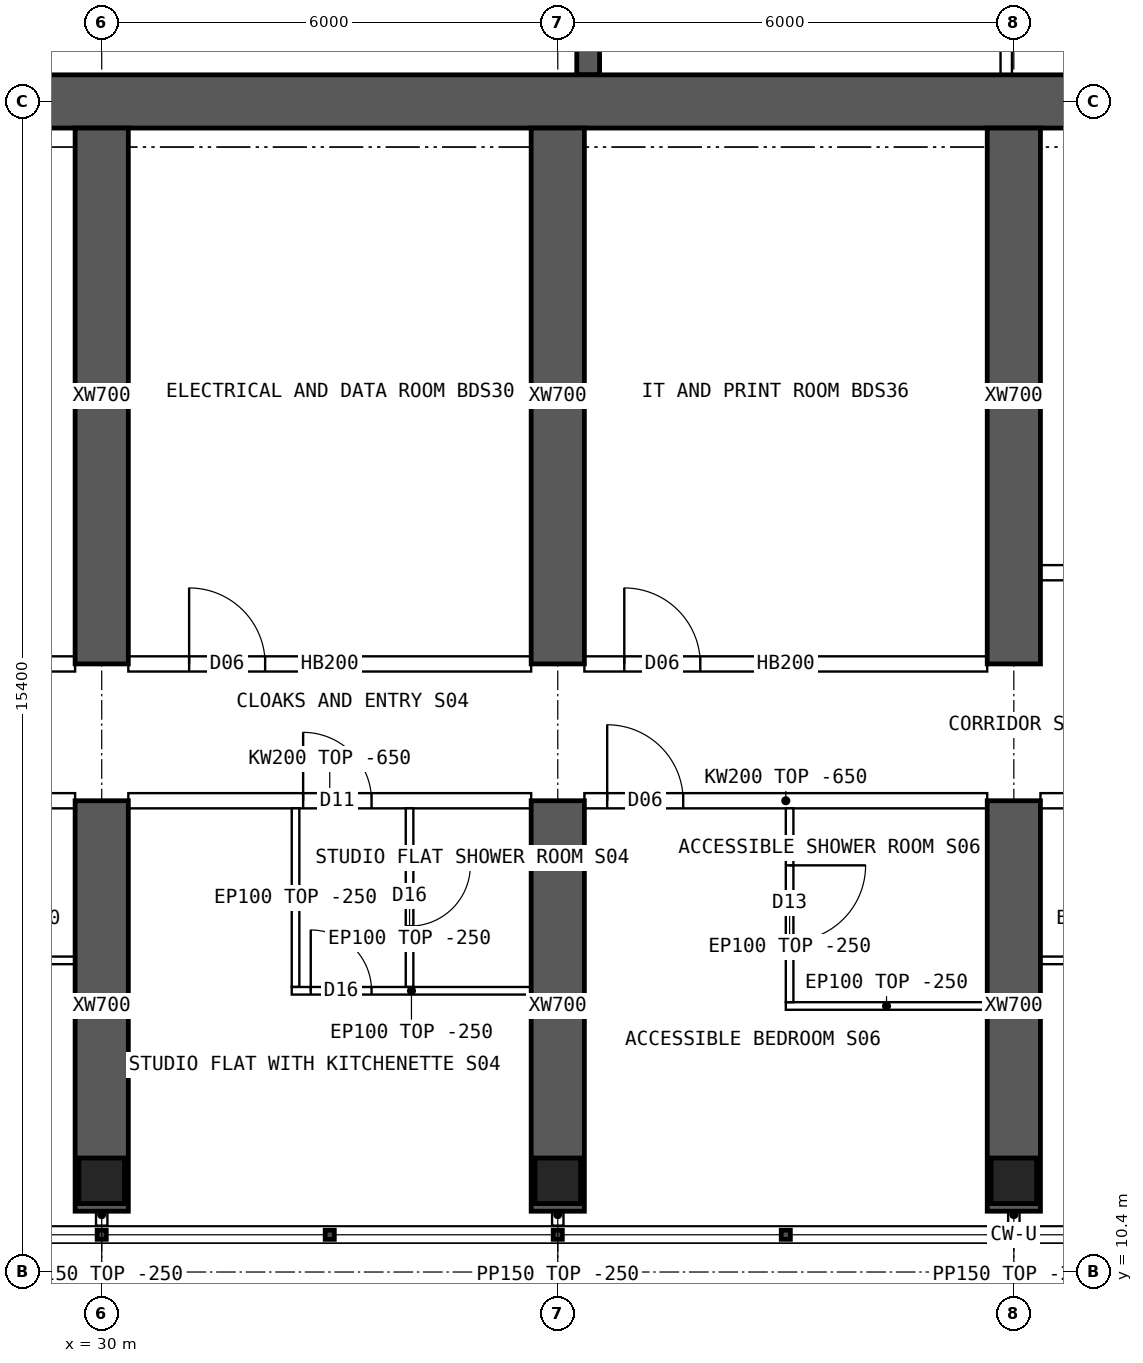
"""IFC4 building model, lengths in metres.
Left out: names, types, materials, properties, quantities, classifications, styles, units other than length and angle.
Written with IfcOpenShell. Run it as: python <this file> out.ifc"""

import sys

from ifc_helpers import new_model, si_unit, direction, frame, frame_2d, origin, origin_2d, place, context, subcontext, project, spatial, polyline, rectangle, hollow_rectangle, outline, extrude, element, fill, save


model = new_model("IFC4")
c1 = context("Model", 3, precision=1e-05, world=origin(), true_north=direction((0.0, 1.0)))
c2 = subcontext(c1, "Body", "Model", "MODEL_VIEW")
j1 = project(units=[si_unit("LENGTHUNIT", "METRE"), si_unit("PLANEANGLEUNIT", "RADIAN")], contexts=[c1])
p1 = place(None, origin())
s1 = spatial("IfcSite", under=j1, at=p1, CompositionType="ELEMENT")
p2 = place(p1, origin())
s2 = spatial("IfcBuilding", under=s1, at=p2, CompositionType="ELEMENT")
p3 = place(p2, frame((0.0, 0.0, 224.05)))
s3 = spatial("IfcBuildingStorey", under=s2, at=p3, CompositionType="ELEMENT", Elevation=224.05)
for number, where, z_axis, x_axis in (
    (1, (30.0, 11.6, 0.0), (0.0, 0.0, 1.0), (1.0, 0.0, 0.0)),
    (2, (36.0, 11.6, 0.0), (0.0, 0.0, 1.0), (1.0, 0.0, 0.0)),
    (3, (42.0, 11.6, 0.0), (0.0, 0.0, 1.0), (1.0, 0.0, 0.0)),
):
    element("IfcColumn", number, at=place(p3, frame(where, z_axis=z_axis, x_axis=x_axis)), inside=s3, PredefinedType="COLUMN", context=c2, shape_type="SweptSolid", body=[
        extrude(hollow_rectangle(XDim=0.6, YDim=0.6, WallThickness=0.06, at=origin_2d()), origin(), (0.0, 0.0, 1.0), 3.75),
    ])
p4 = place(p3, frame((18.0, 25.8, 0.0), z_axis=(0.0, 0.0, 1.0), x_axis=(1.0, 0.0, 0.0)))
e4 = element("IfcWall", 4, at=p4, inside=s3, PredefinedType="SHEAR", context=c2, shape_type="SweptSolid", body=[
    extrude(rectangle(XDim=48.0, YDim=0.7, at=frame_2d((24.0, 0.0))), origin(), (0.0, 0.0, 1.0), 3.75),
])
p5 = place(p3, frame((36.4, 26.15, 0.0), z_axis=(0.0, 0.0, 1.0), x_axis=(0.0, 1.0, 0.0)))
e5 = element("IfcWall", 5, at=p5, inside=s3, PredefinedType="SHEAR", context=c2, shape_type="SweptSolid", body=[
    extrude(rectangle(XDim=4.1, YDim=0.3, at=frame_2d((2.05, 0.0))), origin(), (0.0, 0.0, 1.0), 3.75),
])
p6 = place(p3, frame((30.0, 11.2, 0.0), z_axis=(0.0, 0.0, 1.0), x_axis=(0.0, 1.0, 0.0)))
e6 = element("IfcWall", 6, at=p6, inside=s3, PredefinedType="SHEAR", context=c2, shape_type="SweptSolid", body=[
    extrude(rectangle(XDim=5.4, YDim=0.7, at=frame_2d((2.7, 0.0))), origin(), (0.0, 0.0, 1.0), 3.75),
])
p7 = place(p3, frame((30.0, 18.4, 0.0), z_axis=(0.0, 0.0, 1.0), x_axis=(0.0, 1.0, 0.0)))
e7 = element("IfcWall", 7, at=p7, inside=s3, PredefinedType="SHEAR", context=c2, shape_type="SweptSolid", body=[
    extrude(rectangle(XDim=7.05, YDim=0.7, at=frame_2d((3.525, 0.0))), origin(), (0.0, 0.0, 1.0), 3.75),
])
p8 = place(p3, frame((36.0, 11.2, 0.0), z_axis=(0.0, 0.0, 1.0), x_axis=(0.0, 1.0, 0.0)))
e8 = element("IfcWall", 8, at=p8, inside=s3, PredefinedType="SHEAR", context=c2, shape_type="SweptSolid", body=[
    extrude(rectangle(XDim=5.4, YDim=0.7, at=frame_2d((2.7, 0.0))), origin(), (0.0, 0.0, 1.0), 3.75),
])
p9 = place(p3, frame((36.0, 18.4, 0.0), z_axis=(0.0, 0.0, 1.0), x_axis=(0.0, 1.0, 0.0)))
e9 = element("IfcWall", 9, at=p9, inside=s3, PredefinedType="SHEAR", context=c2, shape_type="SweptSolid", body=[
    extrude(rectangle(XDim=7.05, YDim=0.7, at=frame_2d((3.525, 0.0))), origin(), (0.0, 0.0, 1.0), 3.75),
])
p10 = place(p3, frame((42.0, 11.2, 0.0), z_axis=(0.0, 0.0, 1.0), x_axis=(0.0, 1.0, 0.0)))
e10 = element("IfcWall", 10, at=p10, inside=s3, PredefinedType="SHEAR", context=c2, shape_type="SweptSolid", body=[
    extrude(rectangle(XDim=5.4, YDim=0.7, at=frame_2d((2.7, 0.0))), origin(), (0.0, 0.0, 1.0), 3.75),
])
p11 = place(p3, frame((42.0, 18.4, 0.0), z_axis=(0.0, 0.0, 1.0), x_axis=(0.0, 1.0, 0.0)))
e11 = element("IfcWall", 11, at=p11, inside=s3, PredefinedType="SHEAR", context=c2, shape_type="SweptSolid", body=[
    extrude(rectangle(XDim=7.05, YDim=0.7, at=frame_2d((3.525, 0.0))), origin(), (0.0, 0.0, 1.0), 3.75),
])
p12 = place(p3, frame((41.9, 26.15, 0.0), z_axis=(0.0, 0.0, 1.0), x_axis=(0.0, 1.0, 0.0)))
e12 = element("IfcWall", 12, at=p12, inside=s3, PredefinedType="SOLIDWALL", context=c2, shape_type="SweptSolid", body=[
    extrude(rectangle(XDim=4.1, YDim=0.15, at=frame_2d((2.05, 0.0))), origin(), (0.0, 0.0, 1.0), 3.5),
])
p13 = place(p3, frame((24.35, 16.6, 0.0), z_axis=(0.0, 0.0, 1.0), x_axis=(1.0, 0.0, 0.0)))
e13 = element("IfcWall", 13, at=p13, inside=s3, PredefinedType="SOLIDWALL", context=c2, shape_type="SweptSolid", body=[
    extrude(outline(polyline([(0.0, 0.0), (5.3, 0.0), (5.3, 3.1), (0.0, 3.1), (0.0, 0.0)])), frame((0.0, 0.1, 0.0), z_axis=(0.0, -1.0, 0.0), x_axis=(1.0, 0.0, 0.0)), (0.0, 0.0, 1.0), 0.2),
])
p14 = place(p13, frame((0.1, 0.0, 0.0)))
e14 = element("IfcOpeningElement", 14, at=p14, cuts=e13, PredefinedType="OPENING", context=c2, shape_type="SweptSolid", body=[
    extrude(rectangle(XDim=0.9, YDim=2.1, at=frame_2d((0.45, 1.05))), frame((0.0, 0.11, 0.0), z_axis=(0.0, -1.0, 0.0), x_axis=(1.0, 0.0, 0.0)), (0.0, 0.0, 1.0), 0.22),
])
p15 = place(p3, frame((24.35, 18.4, 0.0), z_axis=(0.0, 0.0, 1.0), x_axis=(1.0, 0.0, 0.0)))
e15 = element("IfcWall", 15, at=p15, inside=s3, PredefinedType="SOLIDWALL", context=c2, shape_type="SweptSolid", body=[
    extrude(rectangle(XDim=5.3, YDim=0.2, at=frame_2d((2.65, 0.0))), origin(), (0.0, 0.0, 1.0), 3.5),
])
p16 = place(p15, frame((0.15, 0.0, 0.0)))
e16 = element("IfcOpeningElement", 16, at=p16, cuts=e15, PredefinedType="OPENING", context=c2, shape_type="SweptSolid", body=[
    extrude(rectangle(XDim=0.9, YDim=2.1, at=frame_2d((0.45, 1.05))), frame((0.0, 0.11, 0.0), z_axis=(0.0, -1.0, 0.0), x_axis=(1.0, 0.0, 0.0)), (0.0, 0.0, 1.0), 0.22),
])
p17 = place(p15, frame((2.22, 0.0, 0.0)))
e17 = element("IfcOpeningElement", 17, at=p17, cuts=e15, PredefinedType="OPENING", context=c2, shape_type="SweptSolid", body=[
    extrude(rectangle(XDim=0.9, YDim=2.1, at=frame_2d((0.45, 1.05))), frame((0.0, 0.11, 0.0), z_axis=(0.0, -1.0, 0.0), x_axis=(1.0, 0.0, 0.0)), (0.0, 0.0, 1.0), 0.22),
])
p18 = place(p3, frame((30.35, 16.6, 0.0), z_axis=(0.0, 0.0, 1.0), x_axis=(1.0, 0.0, 0.0)))
e18 = element("IfcWall", 18, at=p18, inside=s3, PredefinedType="SOLIDWALL", context=c2, shape_type="SweptSolid", body=[
    extrude(outline(polyline([(0.0, 0.0), (5.3, 0.0), (5.3, 3.1), (0.0, 3.1), (0.0, 0.0)])), frame((0.0, 0.1, 0.0), z_axis=(0.0, -1.0, 0.0), x_axis=(1.0, 0.0, 0.0)), (0.0, 0.0, 1.0), 0.2),
])
p19 = place(p18, frame((2.3, 0.0, 0.0)))
e19 = element("IfcOpeningElement", 19, at=p19, cuts=e18, PredefinedType="OPENING", context=c2, shape_type="SweptSolid", body=[
    extrude(rectangle(XDim=0.9, YDim=2.1, at=frame_2d((0.45, 1.05))), frame((0.0, 0.11, 0.0), z_axis=(0.0, -1.0, 0.0), x_axis=(1.0, 0.0, 0.0)), (0.0, 0.0, 1.0), 0.22),
])
p20 = place(p3, frame((30.35, 18.4, 0.0), z_axis=(0.0, 0.0, 1.0), x_axis=(1.0, 0.0, 0.0)))
e20 = element("IfcWall", 20, at=p20, inside=s3, PredefinedType="SOLIDWALL", context=c2, shape_type="SweptSolid", body=[
    extrude(rectangle(XDim=5.3, YDim=0.2, at=frame_2d((2.65, 0.0))), origin(), (0.0, 0.0, 1.0), 3.5),
])
p21 = place(p20, frame((0.8, 0.0, 0.0)))
e21 = element("IfcOpeningElement", 21, at=p21, cuts=e20, PredefinedType="OPENING", context=c2, shape_type="SweptSolid", body=[
    extrude(rectangle(XDim=1.0, YDim=2.1, at=frame_2d((0.5, 1.05))), frame((0.0, 0.11, 0.0), z_axis=(0.0, -1.0, 0.0), x_axis=(1.0, 0.0, 0.0)), (0.0, 0.0, 1.0), 0.22),
])
p22 = place(p3, frame((36.35, 16.6, 0.0), z_axis=(0.0, 0.0, 1.0), x_axis=(1.0, 0.0, 0.0)))
e22 = element("IfcWall", 22, at=p22, inside=s3, PredefinedType="SOLIDWALL", context=c2, shape_type="SweptSolid", body=[
    extrude(outline(polyline([(0.0, 0.0), (5.3, 0.0), (5.3, 3.1), (0.0, 3.1), (0.0, 0.0)])), frame((0.0, 0.1, 0.0), z_axis=(0.0, -1.0, 0.0), x_axis=(1.0, 0.0, 0.0)), (0.0, 0.0, 1.0), 0.2),
])
p23 = place(p22, frame((0.3, 0.0, 0.0)))
e23 = element("IfcOpeningElement", 23, at=p23, cuts=e22, PredefinedType="OPENING", context=c2, shape_type="SweptSolid", body=[
    extrude(rectangle(XDim=1.0, YDim=2.1, at=frame_2d((0.5, 1.05))), frame((0.0, 0.11, 0.0), z_axis=(0.0, -1.0, 0.0), x_axis=(1.0, 0.0, 0.0)), (0.0, 0.0, 1.0), 0.22),
])
p24 = place(p3, frame((36.35, 18.4, 0.0), z_axis=(0.0, 0.0, 1.0), x_axis=(1.0, 0.0, 0.0)))
e24 = element("IfcWall", 24, at=p24, inside=s3, PredefinedType="SOLIDWALL", context=c2, shape_type="SweptSolid", body=[
    extrude(rectangle(XDim=5.3, YDim=0.2, at=frame_2d((2.65, 0.0))), origin(), (0.0, 0.0, 1.0), 3.5),
])
p25 = place(p24, frame((0.525, 0.0, 0.0)))
e25 = element("IfcOpeningElement", 25, at=p25, cuts=e24, PredefinedType="OPENING", context=c2, shape_type="SweptSolid", body=[
    extrude(rectangle(XDim=1.0, YDim=2.1, at=frame_2d((0.5, 1.05))), frame((0.0, 0.11, 0.0), z_axis=(0.0, -1.0, 0.0), x_axis=(1.0, 0.0, 0.0)), (0.0, 0.0, 1.0), 0.22),
])
p26 = place(p3, frame((42.35, 16.6, 0.0), z_axis=(0.0, 0.0, 1.0), x_axis=(1.0, 0.0, 0.0)))
e26 = element("IfcWall", 26, at=p26, inside=s3, PredefinedType="SOLIDWALL", context=c2, shape_type="SweptSolid", body=[
    extrude(outline(polyline([(0.0, 0.0), (5.3, 0.0), (5.3, 3.1), (0.0, 3.1), (0.0, 0.0)])), frame((0.0, 0.1, 0.0), z_axis=(0.0, -1.0, 0.0), x_axis=(1.0, 0.0, 0.0)), (0.0, 0.0, 1.0), 0.2),
])
p27 = place(p26, frame((2.6, 0.0, 0.0)))
e27 = element("IfcOpeningElement", 27, at=p27, cuts=e26, PredefinedType="OPENING", context=c2, shape_type="SweptSolid", body=[
    extrude(rectangle(XDim=0.9, YDim=2.1, at=frame_2d((0.45, 1.05))), frame((0.0, 0.11, 0.0), z_axis=(0.0, -1.0, 0.0), x_axis=(1.0, 0.0, 0.0)), (0.0, 0.0, 1.0), 0.22),
])
p28 = place(p3, frame((29.65, 14.5, 0.0), z_axis=(0.0, 0.0, 1.0), x_axis=(-1.0, 0.0, 0.0)))
e28 = element("IfcWall", 28, at=p28, inside=s3, PredefinedType="PARTITIONING", context=c2, shape_type="SweptSolid", body=[
    extrude(rectangle(XDim=2.55, YDim=0.1, at=frame_2d((1.275, 0.0))), origin(), (0.0, 0.0, 1.0), 3.5),
])
p29 = place(p28, frame((0.825, 0.0, 0.0)))
e29 = element("IfcOpeningElement", 29, at=p29, cuts=e28, PredefinedType="OPENING", context=c2, shape_type="SweptSolid", body=[
    extrude(rectangle(XDim=0.9, YDim=2.1, at=frame_2d((0.45, 1.05))), frame((0.0, 0.06, 0.0), z_axis=(0.0, -1.0, 0.0), x_axis=(1.0, 0.0, 0.0)), (0.0, 0.0, 1.0), 0.12),
])
p30 = place(p3, frame((35.65, 14.1, 0.0), z_axis=(0.0, 0.0, 1.0), x_axis=(-1.0, 0.0, 0.0)))
e30 = element("IfcWall", 30, at=p30, inside=s3, PredefinedType="PARTITIONING", context=c2, shape_type="SweptSolid", body=[
    extrude(rectangle(XDim=3.15, YDim=0.1, at=frame_2d((1.575, 0.0))), origin(), (0.0, 0.0, 1.0), 3.5),
])
p31 = place(p30, frame((2.1, 0.0, 0.0)))
e31 = element("IfcOpeningElement", 31, at=p31, cuts=e30, PredefinedType="OPENING", context=c2, shape_type="SweptSolid", body=[
    extrude(rectangle(XDim=0.8, YDim=2.1, at=frame_2d((0.4, 1.05))), frame((0.0, 0.06, 0.0), z_axis=(0.0, -1.0, 0.0), x_axis=(1.0, 0.0, 0.0)), (0.0, 0.0, 1.0), 0.12),
])
p32 = place(p3, frame((32.55, 14.15, 0.0), z_axis=(0.0, 0.0, 1.0), x_axis=(0.0, 1.0, 0.0)))
e32 = element("IfcWall", 32, at=p32, inside=s3, PredefinedType="PARTITIONING", context=c2, shape_type="SweptSolid", body=[
    extrude(outline(polyline([(0.0, 0.0), (2.35, 0.0), (2.35, 3.1), (2.302, 3.1), (2.3, 3.5), (0.0, 3.5), (0.0, 0.0)])), frame((0.0, 0.05, 0.0), z_axis=(0.0, -1.0, 0.0), x_axis=(1.0, 0.0, 0.0)), (0.0, 0.0, 1.0), 0.1),
])
p33 = place(p3, frame((34.05, 14.15, 0.0), z_axis=(0.0, 0.0, 1.0), x_axis=(0.0, 1.0, 0.0)))
e33 = element("IfcWall", 33, at=p33, inside=s3, PredefinedType="PARTITIONING", context=c2, shape_type="SweptSolid", body=[
    extrude(outline(polyline([(0.0, 0.0), (2.35, 0.0), (2.35, 3.1), (2.302, 3.1), (2.3, 3.5), (0.0, 3.5), (0.0, 0.0)])), frame((0.0, 0.05, 0.0), z_axis=(0.0, -1.0, 0.0), x_axis=(1.0, 0.0, 0.0)), (0.0, 0.0, 1.0), 0.1),
])
p34 = place(p33, frame((0.8, 0.0, 0.0)))
e34 = element("IfcOpeningElement", 34, at=p34, cuts=e33, PredefinedType="OPENING", context=c2, shape_type="SweptSolid", body=[
    extrude(rectangle(XDim=0.8, YDim=2.1, at=frame_2d((0.4, 1.05))), frame((0.0, 0.06, 0.0), z_axis=(0.0, -1.0, 0.0), x_axis=(1.0, 0.0, 0.0)), (0.0, 0.0, 1.0), 0.12),
])
p35 = place(p3, frame((39.0, 13.9, 0.0), z_axis=(0.0, 0.0, 1.0), x_axis=(1.0, 0.0, 0.0)))
e35 = element("IfcWall", 35, at=p35, inside=s3, PredefinedType="PARTITIONING", context=c2, shape_type="SweptSolid", body=[
    extrude(rectangle(XDim=2.65, YDim=0.1, at=frame_2d((1.325, 0.0))), origin(), (0.0, 0.0, 1.0), 3.5),
])
p36 = place(p3, frame((39.05, 13.95, 0.0), z_axis=(0.0, 0.0, 1.0), x_axis=(0.0, 1.0, 0.0)))
e36 = element("IfcWall", 36, at=p36, inside=s3, PredefinedType="PARTITIONING", context=c2, shape_type="SweptSolid", body=[
    extrude(outline(polyline([(0.0, 0.0), (2.55, 0.0), (2.55, 3.1), (2.502, 3.1), (2.5, 3.5), (0.0, 3.5), (0.0, 0.0)])), frame((0.0, 0.05, 0.0), z_axis=(0.0, -1.0, 0.0), x_axis=(1.0, 0.0, 0.0)), (0.0, 0.0, 1.0), 0.1),
])
p37 = place(p36, frame((0.8, 0.0, 0.0)))
e37 = element("IfcOpeningElement", 37, at=p37, cuts=e36, PredefinedType="OPENING", context=c2, shape_type="SweptSolid", body=[
    extrude(rectangle(XDim=1.0, YDim=2.1, at=frame_2d((0.5, 1.05))), frame((0.0, 0.06, 0.0), z_axis=(0.0, -1.0, 0.0), x_axis=(1.0, 0.0, 0.0)), (0.0, 0.0, 1.0), 0.12),
])
p38 = place(p3, frame((44.9, 14.5, 0.0), z_axis=(0.0, 0.0, 1.0), x_axis=(-1.0, 0.0, 0.0)))
e38 = element("IfcWall", 38, at=p38, inside=s3, PredefinedType="PARTITIONING", context=c2, shape_type="SweptSolid", body=[
    extrude(rectangle(XDim=2.55, YDim=0.1, at=frame_2d((1.275, 0.0))), origin(), (0.0, 0.0, 1.0), 3.5),
])
p39 = place(p38, frame((0.825, 0.0, 0.0)))
e39 = element("IfcOpeningElement", 39, at=p39, cuts=e38, PredefinedType="OPENING", context=c2, shape_type="SweptSolid", body=[
    extrude(rectangle(XDim=0.9, YDim=2.1, at=frame_2d((0.45, 1.05))), frame((0.0, 0.06, 0.0), z_axis=(0.0, -1.0, 0.0), x_axis=(1.0, 0.0, 0.0)), (0.0, 0.0, 1.0), 0.12),
])
p40 = place(p3, frame((42.35, 19.6, 0.0), z_axis=(0.0, 0.0, 1.0), x_axis=(1.0, 0.0, 0.0)))
e40 = element("IfcWall", 40, at=p40, inside=s3, PredefinedType="SOLIDWALL", context=c2, shape_type="SweptSolid", body=[
    extrude(rectangle(XDim=5.3, YDim=0.2, at=frame_2d((2.65, 0.0))), origin(), (0.0, 0.0, 1.0), 3.5),
])
p41 = place(p40, frame((0.8, 0.0, 0.0)))
e41 = element("IfcOpeningElement", 41, at=p41, cuts=e40, PredefinedType="OPENING", context=c2, shape_type="SweptSolid", body=[
    extrude(rectangle(XDim=1.0, YDim=2.1, at=frame_2d((0.5, 1.05))), frame((0.0, 0.11, 0.0), z_axis=(0.0, -1.0, 0.0), x_axis=(1.0, 0.0, 0.0)), (0.0, 0.0, 1.0), 0.22),
])
for number, where, z_axis, x_axis in (
    (42, (30.0, 11.3, 0.0), (0.0, 0.0, 1.0), (0.0, -1.0, 0.0)),
    (43, (36.0, 11.3, 0.0), (0.0, 0.0, 1.0), (0.0, -1.0, 0.0)),
    (44, (42.0, 11.3, 0.0), (0.0, 0.0, 1.0), (0.0, -1.0, 0.0)),
):
    element("IfcWall", number, at=place(p3, frame(where, z_axis=z_axis, x_axis=x_axis)), inside=s3, PredefinedType="PARTITIONING", context=c2, shape_type="SweptSolid", body=[
        extrude(rectangle(XDim=0.29, YDim=0.15, at=frame_2d((0.145, 0.0))), origin(), (0.0, 0.0, 1.0), 3.5),
    ])
p42 = place(p31, origin())
e45 = element("IfcDoor", 45, at=p42, inside=s3, OperationType="SINGLE_SWING_RIGHT", PredefinedType="DOOR", context=c2, shape_type="SweptSolid", body=[
    extrude(rectangle(XDim=0.8, YDim=2.1, at=frame_2d((0.4, 1.05))), frame((0.0, 0.025, 0.0), z_axis=(0.0, -1.0, 0.0), x_axis=(1.0, 0.0, 0.0)), (0.0, 0.0, 1.0), 0.05),
])
fill(e31, e45)
p43 = place(p34, origin())
e46 = element("IfcDoor", 46, at=p43, inside=s3, OperationType="SINGLE_SWING_RIGHT", PredefinedType="DOOR", context=c2, shape_type="SweptSolid", body=[
    extrude(rectangle(XDim=0.8, YDim=2.1, at=frame_2d((0.4, 1.05))), frame((0.0, 0.025, 0.0), z_axis=(0.0, -1.0, 0.0), x_axis=(1.0, 0.0, 0.0)), (0.0, 0.0, 1.0), 0.05),
])
fill(e34, e46)
p44 = place(p19, origin())
e47 = element("IfcDoor", 47, at=p44, inside=s3, OperationType="SINGLE_SWING_LEFT", PredefinedType="DOOR", context=c2, shape_type="SweptSolid", body=[
    extrude(rectangle(XDim=0.9, YDim=2.1, at=frame_2d((0.45, 1.05))), frame((0.0, 0.025, 0.0), z_axis=(0.0, -1.0, 0.0), x_axis=(1.0, 0.0, 0.0)), (0.0, 0.0, 1.0), 0.05),
])
fill(e19, e47)
p45 = place(p37, origin())
e48 = element("IfcDoor", 48, at=p45, inside=s3, OperationType="SINGLE_SWING_RIGHT", PredefinedType="DOOR", context=c2, shape_type="SweptSolid", body=[
    extrude(rectangle(XDim=1.0, YDim=2.1, at=frame_2d((0.5, 1.05))), frame((0.0, 0.025, 0.0), z_axis=(0.0, -1.0, 0.0), x_axis=(1.0, 0.0, 0.0)), (0.0, 0.0, 1.0), 0.05),
])
fill(e37, e48)
p46 = place(p23, origin())
e49 = element("IfcDoor", 49, at=p46, inside=s3, OperationType="SINGLE_SWING_LEFT", PredefinedType="DOOR", context=c2, shape_type="SweptSolid", body=[
    extrude(rectangle(XDim=1.0, YDim=2.1, at=frame_2d((0.5, 1.05))), frame((0.0, 0.025, 0.0), z_axis=(0.0, -1.0, 0.0), x_axis=(1.0, 0.0, 0.0)), (0.0, 0.0, 1.0), 0.05),
])
fill(e23, e49)
p47 = place(p21, origin())
e50 = element("IfcDoor", 50, at=p47, inside=s3, OperationType="SINGLE_SWING_LEFT", PredefinedType="DOOR", context=c2, shape_type="SweptSolid", body=[
    extrude(rectangle(XDim=1.0, YDim=2.1, at=frame_2d((0.5, 1.05))), frame((0.0, 0.025, 0.0), z_axis=(0.0, -1.0, 0.0), x_axis=(1.0, 0.0, 0.0)), (0.0, 0.0, 1.0), 0.05),
])
fill(e21, e50)
p48 = place(p25, origin())
e51 = element("IfcDoor", 51, at=p48, inside=s3, OperationType="SINGLE_SWING_LEFT", PredefinedType="DOOR", context=c2, shape_type="SweptSolid", body=[
    extrude(rectangle(XDim=1.0, YDim=2.1, at=frame_2d((0.5, 1.05))), frame((0.0, 0.025, 0.0), z_axis=(0.0, -1.0, 0.0), x_axis=(1.0, 0.0, 0.0)), (0.0, 0.0, 1.0), 0.05),
])
fill(e25, e51)
save(model, sys.argv[1])
